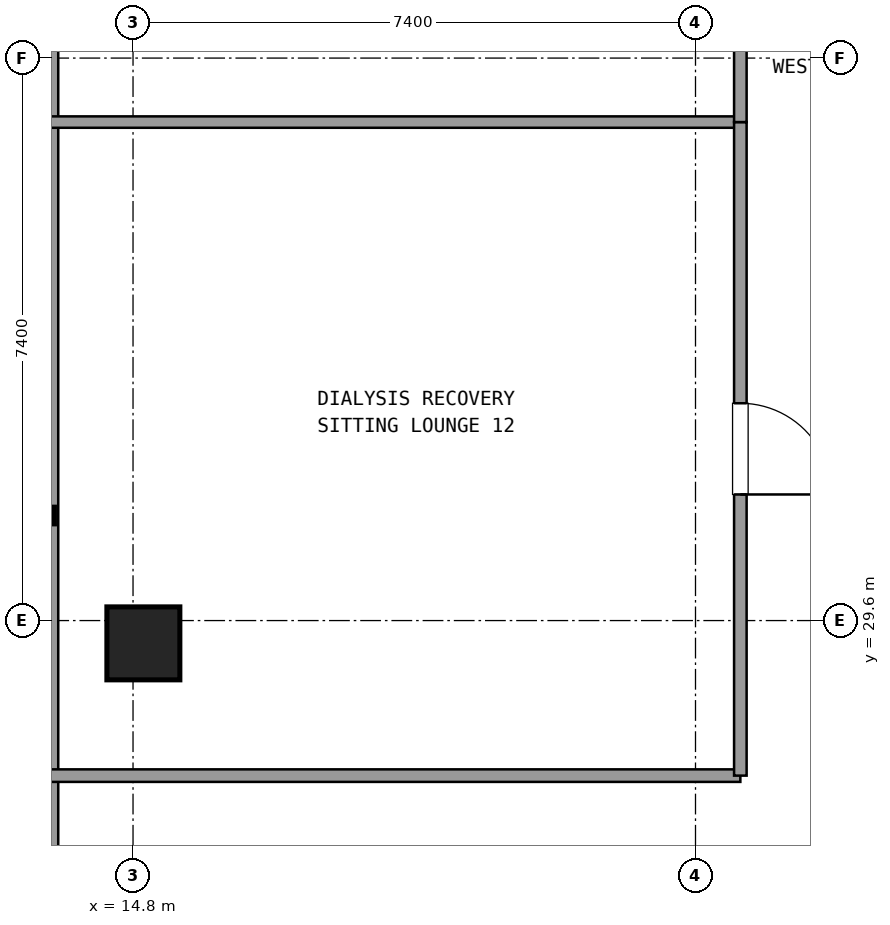
"""IFC4 building model, lengths in metres.
Left out: names, types, materials, properties, quantities, classifications, styles, units other than length and angle.
Written with IfcOpenShell. Run it as: python <this file> out.ifc"""

import sys

from ifc_helpers import new_model, si_unit, direction, frame, frame_2d, origin, origin_2d, place, context, subcontext, project, spatial, rectangle, extrude, element, fill, save


model = new_model("IFC4")
c1 = context("Model", 3, precision=1e-05, world=origin(), true_north=direction((0.0, 1.0)))
c2 = subcontext(c1, "Body", "Model", "MODEL_VIEW")
j1 = project(units=[si_unit("LENGTHUNIT", "METRE"), si_unit("PLANEANGLEUNIT", "RADIAN")], contexts=[c1])
p1 = place(None, origin())
s1 = spatial("IfcSite", under=j1, at=p1, CompositionType="ELEMENT")
p2 = place(p1, origin())
s2 = spatial("IfcBuilding", under=s1, at=p2, CompositionType="ELEMENT")
p3 = place(p2, frame((0.0, 0.0, 152.82)))
s3 = spatial("IfcBuildingStorey", under=s2, at=p3, CompositionType="ELEMENT", Elevation=152.82)
p4 = place(p3, frame((14.936, 29.3, 0.0), z_axis=(0.0, 0.0, 1.0), x_axis=(1.0, 0.0, 0.0)))
e1 = element("IfcColumn", 1, at=p4, inside=s3, PredefinedType="COLUMN", context=c2, shape_type="SweptSolid", body=[
    extrude(rectangle(XDim=0.96, YDim=0.96, at=origin_2d()), origin(), (0.0, 0.0, 1.0), 3.6),
])
p5 = place(p3, frame((13.696, 41.145, 0.0), z_axis=(0.0, 0.0, 1.0), x_axis=(0.0, -1.0, 0.0)))
e2 = element("IfcWall", 2, at=p5, inside=s3, PredefinedType="SOLIDWALL", context=c2, shape_type="SweptSolid", body=[
    extrude(rectangle(XDim=30.49, YDim=0.24, at=frame_2d((15.245, 0.0))), origin(), (0.0, 0.0, 1.0), 0.85),
])
p6 = place(p3, frame((13.716, 27.56, 0.0), z_axis=(0.0, 0.0, 1.0), x_axis=(1.0, 0.0, 0.0)))
e3 = element("IfcWall", 3, at=p6, inside=s3, PredefinedType="PARTITIONING", context=c2, shape_type="SweptSolid", body=[
    extrude(rectangle(XDim=9.074, YDim=0.165, at=frame_2d((4.537, 0.0))), origin(), (0.0, 0.0, 1.0), 2.61),
])
p7 = place(p3, frame((22.79, 36.158, 0.0), z_axis=(0.0, 0.0, 1.0), x_axis=(-1.0, 0.0, 0.0)))
e4 = element("IfcWall", 4, at=p7, inside=s3, PredefinedType="PARTITIONING", context=c2, shape_type="SweptSolid", body=[
    extrude(rectangle(XDim=9.074, YDim=0.15, at=frame_2d((4.537, 0.0))), origin(), (0.0, 0.0, 1.0), 2.61),
])
p8 = place(p3, frame((22.79, 27.56, 0.0), z_axis=(0.0, 0.0, 1.0), x_axis=(0.0, 1.0, 0.0)))
e5 = element("IfcWall", 5, at=p8, inside=s3, PredefinedType="PARTITIONING", context=c2, shape_type="SweptSolid", body=[
    extrude(rectangle(XDim=8.598, YDim=0.165, at=frame_2d((4.299, 0.0))), origin(), (0.0, 0.0, 1.0), 2.61),
])
p9 = place(p8, frame((3.699, 0.0, 0.0)))
e6 = element("IfcOpeningElement", 6, at=p9, cuts=e5, PredefinedType="OPENING", context=c2, shape_type="SweptSolid", body=[
    extrude(rectangle(XDim=1.2, YDim=2.15, at=frame_2d((0.6, 1.075))), frame((0.0, 0.093, 0.0), z_axis=(0.0, -1.0, 0.0), x_axis=(1.0, 0.0, 0.0)), (0.0, 0.0, 1.0), 0.185),
])
p10 = place(p3, frame((22.79, 36.158, 0.0), z_axis=(0.0, 0.0, 1.0), x_axis=(0.0, 1.0, 0.0)))
e7 = element("IfcWall", 7, at=p10, inside=s3, PredefinedType="PARTITIONING", context=c2, shape_type="SweptSolid", body=[
    extrude(rectangle(XDim=10.942, YDim=0.165, at=frame_2d((5.471, 0.0))), origin(), (0.0, 0.0, 1.0), 2.61),
])
p11 = place(p10, frame((4.871, 0.0, 0.0)))
e8 = element("IfcOpeningElement", 8, at=p11, cuts=e7, PredefinedType="OPENING", context=c2, shape_type="SweptSolid", body=[
    extrude(rectangle(XDim=1.2, YDim=2.15, at=frame_2d((0.6, 1.075))), frame((0.0, 0.093, 0.0), z_axis=(0.0, -1.0, 0.0), x_axis=(1.0, 0.0, 0.0)), (0.0, 0.0, 1.0), 0.185),
])
p12 = place(p9, frame((1.2, 0.0, 0.0), z_axis=(0.0, 0.0, 1.0), x_axis=(-1.0, 0.0, 0.0)))
e9 = element("IfcDoor", 9, at=p12, inside=s3, OperationType="SINGLE_SWING_LEFT", PredefinedType="DOOR", context=c2, shape_type="SweptSolid", body=[
    extrude(rectangle(XDim=1.2, YDim=2.15, at=frame_2d((0.6, 1.075))), frame((0.0, 0.025, 0.0), z_axis=(0.0, -1.0, 0.0), x_axis=(1.0, 0.0, 0.0)), (0.0, 0.0, 1.0), 0.05),
])
fill(e6, e9)
save(model, sys.argv[1])
